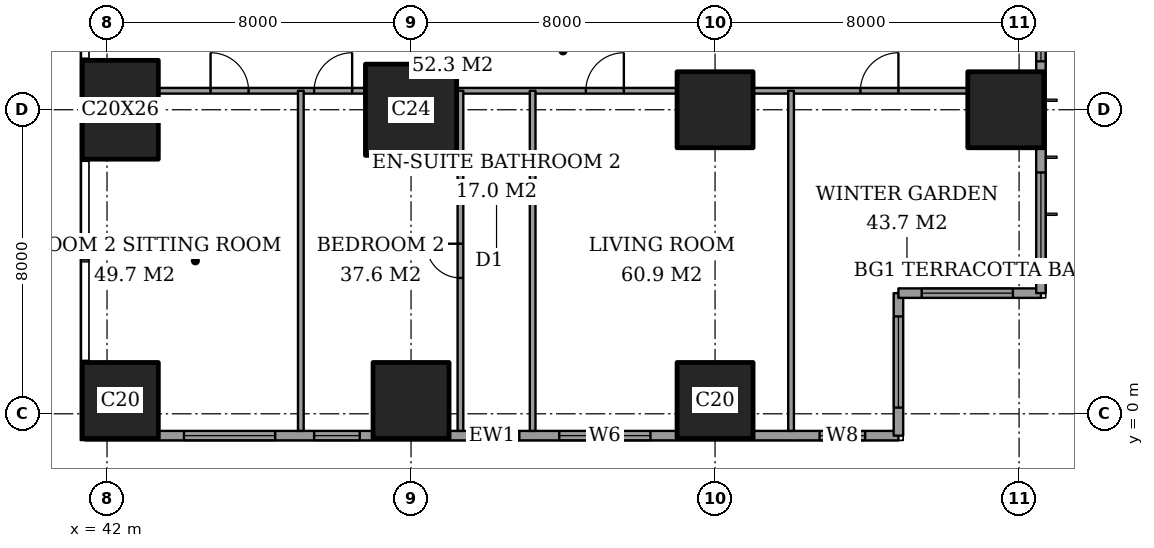
"""IFC4 building model, lengths in metres.
Left out: names, types, materials, properties, quantities, classifications, styles, units other than length and angle.
Written with IfcOpenShell. Run it as: python <this file> out.ifc"""

import sys

from ifc_helpers import new_model, si_unit, direction, frame, frame_2d, origin, origin_2d, place, context, subcontext, project, spatial, rectangle, extrude, element, fill, save


model = new_model("IFC4")
c1 = context("Model", 3, precision=1e-05, world=origin(), true_north=direction((0.0, 1.0)))
c2 = subcontext(c1, "Body", "Model", "MODEL_VIEW")
j1 = project(units=[si_unit("LENGTHUNIT", "METRE"), si_unit("PLANEANGLEUNIT", "RADIAN")], contexts=[c1])
p1 = place(None, origin())
s1 = spatial("IfcSite", under=j1, at=p1, CompositionType="ELEMENT")
p2 = place(p1, origin())
s2 = spatial("IfcBuilding", under=s1, at=p2, CompositionType="ELEMENT")
p3 = place(p2, frame((0.0, 0.0, 65.6)))
s3 = spatial("IfcBuildingStorey", under=s2, at=p3, CompositionType="ELEMENT", Elevation=65.6)
p4 = place(p3, frame((42.35, 0.35, 0.0), z_axis=(0.0, 0.0, 1.0), x_axis=(1.0, 0.0, 0.0)))
e1 = element("IfcColumn", 1, at=p4, inside=s3, PredefinedType="COLUMN", context=c2, shape_type="SweptSolid", body=[
    extrude(rectangle(XDim=2.0, YDim=2.0, at=origin_2d()), origin(), (0.0, 0.0, 1.0), 3.6),
])
p5 = place(p3, frame((42.35, 8.0, 0.0), z_axis=(0.0, 0.0, 1.0), x_axis=(1.0, 0.0, 0.0)))
e2 = element("IfcColumn", 2, at=p5, inside=s3, PredefinedType="COLUMN", context=c2, shape_type="SweptSolid", body=[
    extrude(rectangle(XDim=2.0, YDim=2.6, at=origin_2d()), origin(), (0.0, 0.0, 1.0), 3.6),
])
p6 = place(p3, frame((50.0, 0.35, 0.0), z_axis=(0.0, 0.0, 1.0), x_axis=(1.0, 0.0, 0.0)))
e3 = element("IfcColumn", 3, at=p6, inside=s3, PredefinedType="COLUMN", context=c2, shape_type="SweptSolid", body=[
    extrude(rectangle(XDim=2.0, YDim=2.0, at=origin_2d()), origin(), (0.0, 0.0, 1.0), 3.6),
])
p7 = place(p3, frame((50.0, 8.0, 0.0), z_axis=(0.0, 0.0, 1.0), x_axis=(1.0, 0.0, 0.0)))
e4 = element("IfcColumn", 4, at=p7, inside=s3, PredefinedType="COLUMN", context=c2, shape_type="SweptSolid", body=[
    extrude(rectangle(XDim=2.4, YDim=2.4, at=origin_2d()), origin(), (0.0, 0.0, 1.0), 3.6),
])
for number, where, z_axis, x_axis in (
    (5, (58.0, 0.35, 0.0), (0.0, 0.0, 1.0), (1.0, 0.0, 0.0)),
    (6, (58.0, 8.0, 0.0), (0.0, 0.0, 1.0), (1.0, 0.0, 0.0)),
    (7, (65.65, 8.0, 0.0), (0.0, 0.0, 1.0), (1.0, 0.0, 0.0)),
):
    element("IfcColumn", number, at=place(p3, frame(where, z_axis=z_axis, x_axis=x_axis)), inside=s3, PredefinedType="COLUMN", context=c2, shape_type="SweptSolid", body=[
        extrude(rectangle(XDim=2.0, YDim=2.0, at=origin_2d()), origin(), (0.0, 0.0, 1.0), 3.6),
    ])
p8 = place(p3, frame((41.425, -0.575, 0.0), z_axis=(0.0, 0.0, 1.0), x_axis=(1.0, 0.0, 0.0)))
e8 = element("IfcWall", 8, at=p8, inside=s3, PredefinedType="SOLIDWALL", context=c2, shape_type="SweptSolid", body=[
    extrude(rectangle(XDim=21.4, YDim=0.25, at=frame_2d((10.7, 0.0))), origin(), (0.0, 0.0, 1.0), 3.6),
])
p9 = place(p8, frame((2.6, 0.0, 0.6)))
e9 = element("IfcOpeningElement", 9, at=p9, cuts=e8, PredefinedType="OPENING", context=c2, shape_type="SweptSolid", body=[
    extrude(rectangle(XDim=2.4, YDim=2.0, at=frame_2d((1.2, 1.0))), frame((0.0, 0.135, 0.0), z_axis=(0.0, -1.0, 0.0), x_axis=(1.0, 0.0, 0.0)), (0.0, 0.0, 1.0), 0.27),
])
p10 = place(p8, frame((6.025, 0.0, 0.6)))
e10 = element("IfcOpeningElement", 10, at=p10, cuts=e8, PredefinedType="OPENING", context=c2, shape_type="SweptSolid", body=[
    extrude(rectangle(XDim=1.2, YDim=2.0, at=frame_2d((0.6, 1.0))), frame((0.0, 0.135, 0.0), z_axis=(0.0, -1.0, 0.0), x_axis=(1.0, 0.0, 0.0)), (0.0, 0.0, 1.0), 0.27),
])
p11 = place(p8, frame((10.225, 0.0, 0.6)))
e11 = element("IfcOpeningElement", 11, at=p11, cuts=e8, PredefinedType="OPENING", context=c2, shape_type="SweptSolid", body=[
    extrude(rectangle(XDim=1.2, YDim=2.0, at=frame_2d((0.6, 1.0))), frame((0.0, 0.135, 0.0), z_axis=(0.0, -1.0, 0.0), x_axis=(1.0, 0.0, 0.0)), (0.0, 0.0, 1.0), 0.27),
])
p12 = place(p8, frame((12.475, 0.0, 0.6)))
e12 = element("IfcOpeningElement", 12, at=p12, cuts=e8, PredefinedType="OPENING", context=c2, shape_type="SweptSolid", body=[
    extrude(rectangle(XDim=2.4, YDim=2.0, at=frame_2d((1.2, 1.0))), frame((0.0, 0.135, 0.0), z_axis=(0.0, -1.0, 0.0), x_axis=(1.0, 0.0, 0.0)), (0.0, 0.0, 1.0), 0.27),
])
p13 = place(p8, frame((19.325, 0.0, 0.6)))
e13 = element("IfcOpeningElement", 13, at=p13, cuts=e8, PredefinedType="OPENING", context=c2, shape_type="SweptSolid", body=[
    extrude(rectangle(XDim=1.2, YDim=2.0, at=frame_2d((0.6, 1.0))), frame((0.0, 0.135, 0.0), z_axis=(0.0, -1.0, 0.0), x_axis=(1.0, 0.0, 0.0)), (0.0, 0.0, 1.0), 0.27),
])
p14 = place(p3, frame((62.825, -0.575, 0.0), z_axis=(0.0, 0.0, 1.0), x_axis=(0.0, 1.0, 0.0)))
e14 = element("IfcWall", 14, at=p14, inside=s3, PredefinedType="SOLIDWALL", context=c2, shape_type="SweptSolid", body=[
    extrude(rectangle(XDim=3.75, YDim=0.25, at=frame_2d((1.875, 0.0))), origin(), (0.0, 0.0, 1.0), 3.6),
])
p15 = place(p14, frame((0.738, 0.0, 0.6)))
e15 = element("IfcOpeningElement", 15, at=p15, cuts=e14, PredefinedType="OPENING", context=c2, shape_type="SweptSolid", body=[
    extrude(rectangle(XDim=2.4, YDim=2.0, at=frame_2d((1.2, 1.0))), frame((0.0, 0.135, 0.0), z_axis=(0.0, -1.0, 0.0), x_axis=(1.0, 0.0, 0.0)), (0.0, 0.0, 1.0), 0.27),
])
p16 = place(p3, frame((62.825, 3.175, 0.0), z_axis=(0.0, 0.0, 1.0), x_axis=(1.0, 0.0, 0.0)))
e16 = element("IfcWall", 16, at=p16, inside=s3, PredefinedType="SOLIDWALL", context=c2, shape_type="SweptSolid", body=[
    extrude(rectangle(XDim=3.75, YDim=0.25, at=frame_2d((1.875, 0.0))), origin(), (0.0, 0.0, 1.0), 3.6),
])
p17 = place(p16, frame((0.613, 0.0, 0.6)))
e17 = element("IfcOpeningElement", 17, at=p17, cuts=e16, PredefinedType="OPENING", context=c2, shape_type="SweptSolid", body=[
    extrude(rectangle(XDim=2.4, YDim=2.0, at=frame_2d((1.2, 1.0))), frame((0.0, 0.135, 0.0), z_axis=(0.0, -1.0, 0.0), x_axis=(1.0, 0.0, 0.0)), (0.0, 0.0, 1.0), 0.27),
])
p18 = place(p3, frame((66.575, 3.175, 0.0), z_axis=(0.0, 0.0, 1.0), x_axis=(0.0, 1.0, 0.0)))
e18 = element("IfcWall", 18, at=p18, inside=s3, PredefinedType="SOLIDWALL", context=c2, shape_type="SweptSolid", body=[
    extrude(rectangle(XDim=41.65, YDim=0.25, at=frame_2d((20.825, 0.0))), origin(), (0.0, 0.0, 1.0), 3.6),
])
p19 = place(p18, frame((0.775, 0.0, 0.6)))
e19 = element("IfcOpeningElement", 19, at=p19, cuts=e18, PredefinedType="OPENING", context=c2, shape_type="SweptSolid", body=[
    extrude(rectangle(XDim=2.4, YDim=2.0, at=frame_2d((1.2, 1.0))), frame((0.0, 0.135, 0.0), z_axis=(0.0, -1.0, 0.0), x_axis=(1.0, 0.0, 0.0)), (0.0, 0.0, 1.0), 0.27),
])
p20 = place(p18, frame((6.1, 0.0, 0.6)))
e20 = element("IfcOpeningElement", 20, at=p20, cuts=e18, PredefinedType="OPENING", context=c2, shape_type="SweptSolid", body=[
    extrude(rectangle(XDim=1.2, YDim=2.0, at=frame_2d((0.6, 1.0))), frame((0.0, 0.135, 0.0), z_axis=(0.0, -1.0, 0.0), x_axis=(1.0, 0.0, 0.0)), (0.0, 0.0, 1.0), 0.27),
])
p21 = place(p18, frame((8.275, 0.0, 0.6)))
e21 = element("IfcOpeningElement", 21, at=p21, cuts=e18, PredefinedType="OPENING", context=c2, shape_type="SweptSolid", body=[
    extrude(rectangle(XDim=2.4, YDim=2.0, at=frame_2d((1.2, 1.0))), frame((0.0, 0.135, 0.0), z_axis=(0.0, -1.0, 0.0), x_axis=(1.0, 0.0, 0.0)), (0.0, 0.0, 1.0), 0.27),
])
p22 = place(p18, frame((15.775, 0.0, 0.6)))
e22 = element("IfcOpeningElement", 22, at=p22, cuts=e18, PredefinedType="OPENING", context=c2, shape_type="SweptSolid", body=[
    extrude(rectangle(XDim=2.4, YDim=2.0, at=frame_2d((1.2, 1.0))), frame((0.0, 0.135, 0.0), z_axis=(0.0, -1.0, 0.0), x_axis=(1.0, 0.0, 0.0)), (0.0, 0.0, 1.0), 0.27),
])
p23 = place(p18, frame((23.475, 0.0, 0.6)))
e23 = element("IfcOpeningElement", 23, at=p23, cuts=e18, PredefinedType="OPENING", context=c2, shape_type="SweptSolid", body=[
    extrude(rectangle(XDim=2.4, YDim=2.0, at=frame_2d((1.2, 1.0))), frame((0.0, 0.135, 0.0), z_axis=(0.0, -1.0, 0.0), x_axis=(1.0, 0.0, 0.0)), (0.0, 0.0, 1.0), 0.27),
])
p24 = place(p18, frame((30.875, 0.0, 0.6)))
e24 = element("IfcOpeningElement", 24, at=p24, cuts=e18, PredefinedType="OPENING", context=c2, shape_type="SweptSolid", body=[
    extrude(rectangle(XDim=2.4, YDim=2.0, at=frame_2d((1.2, 1.0))), frame((0.0, 0.135, 0.0), z_axis=(0.0, -1.0, 0.0), x_axis=(1.0, 0.0, 0.0)), (0.0, 0.0, 1.0), 0.27),
])
p25 = place(p18, frame((34.325, 0.0, 0.6)))
e25 = element("IfcOpeningElement", 25, at=p25, cuts=e18, PredefinedType="OPENING", context=c2, shape_type="SweptSolid", body=[
    extrude(rectangle(XDim=1.2, YDim=2.0, at=frame_2d((0.6, 1.0))), frame((0.0, 0.135, 0.0), z_axis=(0.0, -1.0, 0.0), x_axis=(1.0, 0.0, 0.0)), (0.0, 0.0, 1.0), 0.27),
])
p26 = place(p18, frame((38.475, 0.0, 0.6)))
e26 = element("IfcOpeningElement", 26, at=p26, cuts=e18, PredefinedType="OPENING", context=c2, shape_type="SweptSolid", body=[
    extrude(rectangle(XDim=2.4, YDim=2.0, at=frame_2d((1.2, 1.0))), frame((0.0, 0.135, 0.0), z_axis=(0.0, -1.0, 0.0), x_axis=(1.0, 0.0, 0.0)), (0.0, 0.0, 1.0), 0.27),
])
p27 = place(p3, frame((43.35, 8.5, 0.0), z_axis=(0.0, 0.0, 1.0), x_axis=(1.0, 0.0, 0.0)))
e27 = element("IfcWall", 27, at=p27, inside=s3, PredefinedType="PARTITIONING", context=c2, shape_type="SweptSolid", body=[
    extrude(rectangle(XDim=5.45, YDim=0.15, at=frame_2d((2.725, 0.0))), origin(), (0.0, 0.0, 1.0), 3.35),
])
p28 = place(p27, frame((4.1, 0.0, 0.0)))
e28 = element("IfcOpeningElement", 28, at=p28, cuts=e27, PredefinedType="OPENING", context=c2, shape_type="SweptSolid", body=[
    extrude(rectangle(XDim=1.0, YDim=2.1, at=frame_2d((0.5, 1.05))), frame((0.0, 0.085, 0.0), z_axis=(0.0, -1.0, 0.0), x_axis=(1.0, 0.0, 0.0)), (0.0, 0.0, 1.0), 0.17),
])
p29 = place(p27, frame((1.375, 0.0, 0.0)))
e29 = element("IfcOpeningElement", 29, at=p29, cuts=e27, PredefinedType="OPENING", context=c2, shape_type="SweptSolid", body=[
    extrude(rectangle(XDim=1.0, YDim=2.1, at=frame_2d((0.5, 1.05))), frame((0.0, 0.085, 0.0), z_axis=(0.0, -1.0, 0.0), x_axis=(1.0, 0.0, 0.0)), (0.0, 0.0, 1.0), 0.17),
])
p30 = place(p3, frame((51.2, 8.5, 0.0), z_axis=(0.0, 0.0, 1.0), x_axis=(1.0, 0.0, 0.0)))
e30 = element("IfcWall", 30, at=p30, inside=s3, PredefinedType="PARTITIONING", context=c2, shape_type="SweptSolid", body=[
    extrude(rectangle(XDim=5.8, YDim=0.15, at=frame_2d((2.9, 0.0))), origin(), (0.0, 0.0, 1.0), 3.35),
])
p31 = place(p30, frame((3.4, 0.0, 0.0)))
e31 = element("IfcOpeningElement", 31, at=p31, cuts=e30, PredefinedType="OPENING", context=c2, shape_type="SweptSolid", body=[
    extrude(rectangle(XDim=1.0, YDim=2.1, at=frame_2d((0.5, 1.05))), frame((0.0, 0.085, 0.0), z_axis=(0.0, -1.0, 0.0), x_axis=(1.0, 0.0, 0.0)), (0.0, 0.0, 1.0), 0.17),
])
p32 = place(p3, frame((59.0, 8.5, 0.0), z_axis=(0.0, 0.0, 1.0), x_axis=(1.0, 0.0, 0.0)))
e32 = element("IfcWall", 32, at=p32, inside=s3, PredefinedType="PARTITIONING", context=c2, shape_type="SweptSolid", body=[
    extrude(rectangle(XDim=5.65, YDim=0.15, at=frame_2d((2.825, 0.0))), origin(), (0.0, 0.0, 1.0), 3.35),
])
p33 = place(p32, frame((2.825, 0.0, 0.0)))
e33 = element("IfcOpeningElement", 33, at=p33, cuts=e32, PredefinedType="OPENING", context=c2, shape_type="SweptSolid", body=[
    extrude(rectangle(XDim=1.0, YDim=2.1, at=frame_2d((0.5, 1.05))), frame((0.0, 0.085, 0.0), z_axis=(0.0, -1.0, 0.0), x_axis=(1.0, 0.0, 0.0)), (0.0, 0.0, 1.0), 0.17),
])
p34 = place(p3, frame((47.1, -0.45, 0.0), z_axis=(0.0, 0.0, 1.0), x_axis=(0.0, 1.0, 0.0)))
e34 = element("IfcWall", 34, at=p34, inside=s3, PredefinedType="PARTITIONING", context=c2, shape_type="SweptSolid", body=[
    extrude(rectangle(XDim=8.95, YDim=0.15, at=frame_2d((4.475, 0.0))), origin(), (0.0, 0.0, 1.0), 3.35),
])
p35 = place(p3, frame((51.3, -0.45, 0.0), z_axis=(0.0, 0.0, 1.0), x_axis=(0.0, 1.0, 0.0)))
e35 = element("IfcWall", 35, at=p35, inside=s3, PredefinedType="PARTITIONING", context=c2, shape_type="SweptSolid", body=[
    extrude(rectangle(XDim=8.95, YDim=0.15, at=frame_2d((4.475, 0.0))), origin(), (0.0, 0.0, 1.0), 3.35),
])
p36 = place(p35, frame((4.025, 0.0, 0.0)))
e36 = element("IfcOpeningElement", 36, at=p36, cuts=e35, PredefinedType="OPENING", context=c2, shape_type="SweptSolid", body=[
    extrude(rectangle(XDim=0.9, YDim=2.1, at=frame_2d((0.45, 1.05))), frame((0.0, 0.085, 0.0), z_axis=(0.0, -1.0, 0.0), x_axis=(1.0, 0.0, 0.0)), (0.0, 0.0, 1.0), 0.17),
])
for number, where, z_axis, x_axis in (
    (37, (53.2, -0.45, 0.0), (0.0, 0.0, 1.0), (0.0, 1.0, 0.0)),
    (38, (60.0, -0.45, 0.0), (0.0, 0.0, 1.0), (0.0, 1.0, 0.0)),
):
    element("IfcWall", number, at=place(p3, frame(where, z_axis=z_axis, x_axis=x_axis)), inside=s3, PredefinedType="PARTITIONING", context=c2, shape_type="SweptSolid", body=[
        extrude(rectangle(XDim=8.95, YDim=0.15, at=frame_2d((4.475, 0.0))), origin(), (0.0, 0.0, 1.0), 3.35),
    ])
p37 = place(p9, origin())
e39 = element("IfcWindow", 39, at=p37, inside=s3, PartitioningType="SINGLE_PANEL", PredefinedType="WINDOW", context=c2, shape_type="SweptSolid", body=[
    extrude(rectangle(XDim=2.4, YDim=2.0, at=frame_2d((1.2, 1.0))), frame((0.0, 0.03, 0.0), z_axis=(0.0, -1.0, 0.0), x_axis=(1.0, 0.0, 0.0)), (0.0, 0.0, 1.0), 0.06),
])
fill(e9, e39)
p38 = place(p10, origin())
e40 = element("IfcWindow", 40, at=p38, inside=s3, PartitioningType="SINGLE_PANEL", PredefinedType="WINDOW", context=c2, shape_type="SweptSolid", body=[
    extrude(rectangle(XDim=1.2, YDim=2.0, at=frame_2d((0.6, 1.0))), frame((0.0, 0.03, 0.0), z_axis=(0.0, -1.0, 0.0), x_axis=(1.0, 0.0, 0.0)), (0.0, 0.0, 1.0), 0.06),
])
fill(e10, e40)
p39 = place(p11, origin())
e41 = element("IfcWindow", 41, at=p39, inside=s3, PartitioningType="SINGLE_PANEL", PredefinedType="WINDOW", context=c2, shape_type="SweptSolid", body=[
    extrude(rectangle(XDim=1.2, YDim=2.0, at=frame_2d((0.6, 1.0))), frame((0.0, 0.03, 0.0), z_axis=(0.0, -1.0, 0.0), x_axis=(1.0, 0.0, 0.0)), (0.0, 0.0, 1.0), 0.06),
])
fill(e11, e41)
p40 = place(p12, origin())
e42 = element("IfcWindow", 42, at=p40, inside=s3, PartitioningType="SINGLE_PANEL", PredefinedType="WINDOW", context=c2, shape_type="SweptSolid", body=[
    extrude(rectangle(XDim=2.4, YDim=2.0, at=frame_2d((1.2, 1.0))), frame((0.0, 0.03, 0.0), z_axis=(0.0, -1.0, 0.0), x_axis=(1.0, 0.0, 0.0)), (0.0, 0.0, 1.0), 0.06),
])
fill(e12, e42)
p41 = place(p13, origin())
e43 = element("IfcWindow", 43, at=p41, inside=s3, PartitioningType="SINGLE_PANEL", PredefinedType="WINDOW", context=c2, shape_type="SweptSolid", body=[
    extrude(rectangle(XDim=1.2, YDim=2.0, at=frame_2d((0.6, 1.0))), frame((0.0, 0.03, 0.0), z_axis=(0.0, -1.0, 0.0), x_axis=(1.0, 0.0, 0.0)), (0.0, 0.0, 1.0), 0.06),
])
fill(e13, e43)
p42 = place(p15, origin())
e44 = element("IfcWindow", 44, at=p42, inside=s3, PartitioningType="SINGLE_PANEL", PredefinedType="WINDOW", context=c2, shape_type="SweptSolid", body=[
    extrude(rectangle(XDim=2.4, YDim=2.0, at=frame_2d((1.2, 1.0))), frame((0.0, 0.03, 0.0), z_axis=(0.0, -1.0, 0.0), x_axis=(1.0, 0.0, 0.0)), (0.0, 0.0, 1.0), 0.06),
])
fill(e15, e44)
p43 = place(p17, origin())
e45 = element("IfcWindow", 45, at=p43, inside=s3, PartitioningType="SINGLE_PANEL", PredefinedType="WINDOW", context=c2, shape_type="SweptSolid", body=[
    extrude(rectangle(XDim=2.4, YDim=2.0, at=frame_2d((1.2, 1.0))), frame((0.0, 0.03, 0.0), z_axis=(0.0, -1.0, 0.0), x_axis=(1.0, 0.0, 0.0)), (0.0, 0.0, 1.0), 0.06),
])
fill(e17, e45)
p44 = place(p19, origin())
e46 = element("IfcWindow", 46, at=p44, inside=s3, PartitioningType="SINGLE_PANEL", PredefinedType="WINDOW", context=c2, shape_type="SweptSolid", body=[
    extrude(rectangle(XDim=2.4, YDim=2.0, at=frame_2d((1.2, 1.0))), frame((0.0, 0.03, 0.0), z_axis=(0.0, -1.0, 0.0), x_axis=(1.0, 0.0, 0.0)), (0.0, 0.0, 1.0), 0.06),
])
fill(e19, e46)
p45 = place(p20, origin())
e47 = element("IfcWindow", 47, at=p45, inside=s3, PartitioningType="SINGLE_PANEL", PredefinedType="WINDOW", context=c2, shape_type="SweptSolid", body=[
    extrude(rectangle(XDim=1.2, YDim=2.0, at=frame_2d((0.6, 1.0))), frame((0.0, 0.03, 0.0), z_axis=(0.0, -1.0, 0.0), x_axis=(1.0, 0.0, 0.0)), (0.0, 0.0, 1.0), 0.06),
])
fill(e20, e47)
p46 = place(p33, origin())
e48 = element("IfcDoor", 48, at=p46, inside=s3, OperationType="SINGLE_SWING_LEFT", PredefinedType="DOOR", context=c2, shape_type="SweptSolid", body=[
    extrude(rectangle(XDim=1.0, YDim=2.1, at=frame_2d((0.5, 1.05))), frame((0.0, 0.025, 0.0), z_axis=(0.0, -1.0, 0.0), x_axis=(1.0, 0.0, 0.0)), (0.0, 0.0, 1.0), 0.05),
])
fill(e33, e48)
p47 = place(p31, origin())
e49 = element("IfcDoor", 49, at=p47, inside=s3, OperationType="SINGLE_SWING_LEFT", PredefinedType="DOOR", context=c2, shape_type="SweptSolid", body=[
    extrude(rectangle(XDim=1.0, YDim=2.1, at=frame_2d((0.5, 1.05))), frame((0.0, 0.025, 0.0), z_axis=(0.0, -1.0, 0.0), x_axis=(1.0, 0.0, 0.0)), (0.0, 0.0, 1.0), 0.05),
])
fill(e31, e49)
p48 = place(p36, origin())
e50 = element("IfcDoor", 50, at=p48, inside=s3, OperationType="SINGLE_SWING_LEFT", PredefinedType="DOOR", context=c2, shape_type="SweptSolid", body=[
    extrude(rectangle(XDim=0.9, YDim=2.1, at=frame_2d((0.45, 1.05))), frame((0.0, 0.025, 0.0), z_axis=(0.0, -1.0, 0.0), x_axis=(1.0, 0.0, 0.0)), (0.0, 0.0, 1.0), 0.05),
])
fill(e36, e50)
p49 = place(p28, origin())
e51 = element("IfcDoor", 51, at=p49, inside=s3, OperationType="SINGLE_SWING_LEFT", PredefinedType="DOOR", context=c2, shape_type="SweptSolid", body=[
    extrude(rectangle(XDim=1.0, YDim=2.1, at=frame_2d((0.5, 1.05))), frame((0.0, 0.025, 0.0), z_axis=(0.0, -1.0, 0.0), x_axis=(1.0, 0.0, 0.0)), (0.0, 0.0, 1.0), 0.05),
])
fill(e28, e51)
p50 = place(p29, origin())
e52 = element("IfcDoor", 52, at=p50, inside=s3, OperationType="SINGLE_SWING_RIGHT", PredefinedType="DOOR", context=c2, shape_type="SweptSolid", body=[
    extrude(rectangle(XDim=1.0, YDim=2.1, at=frame_2d((0.5, 1.05))), frame((0.0, 0.025, 0.0), z_axis=(0.0, -1.0, 0.0), x_axis=(1.0, 0.0, 0.0)), (0.0, 0.0, 1.0), 0.05),
])
fill(e29, e52)
save(model, sys.argv[1])
